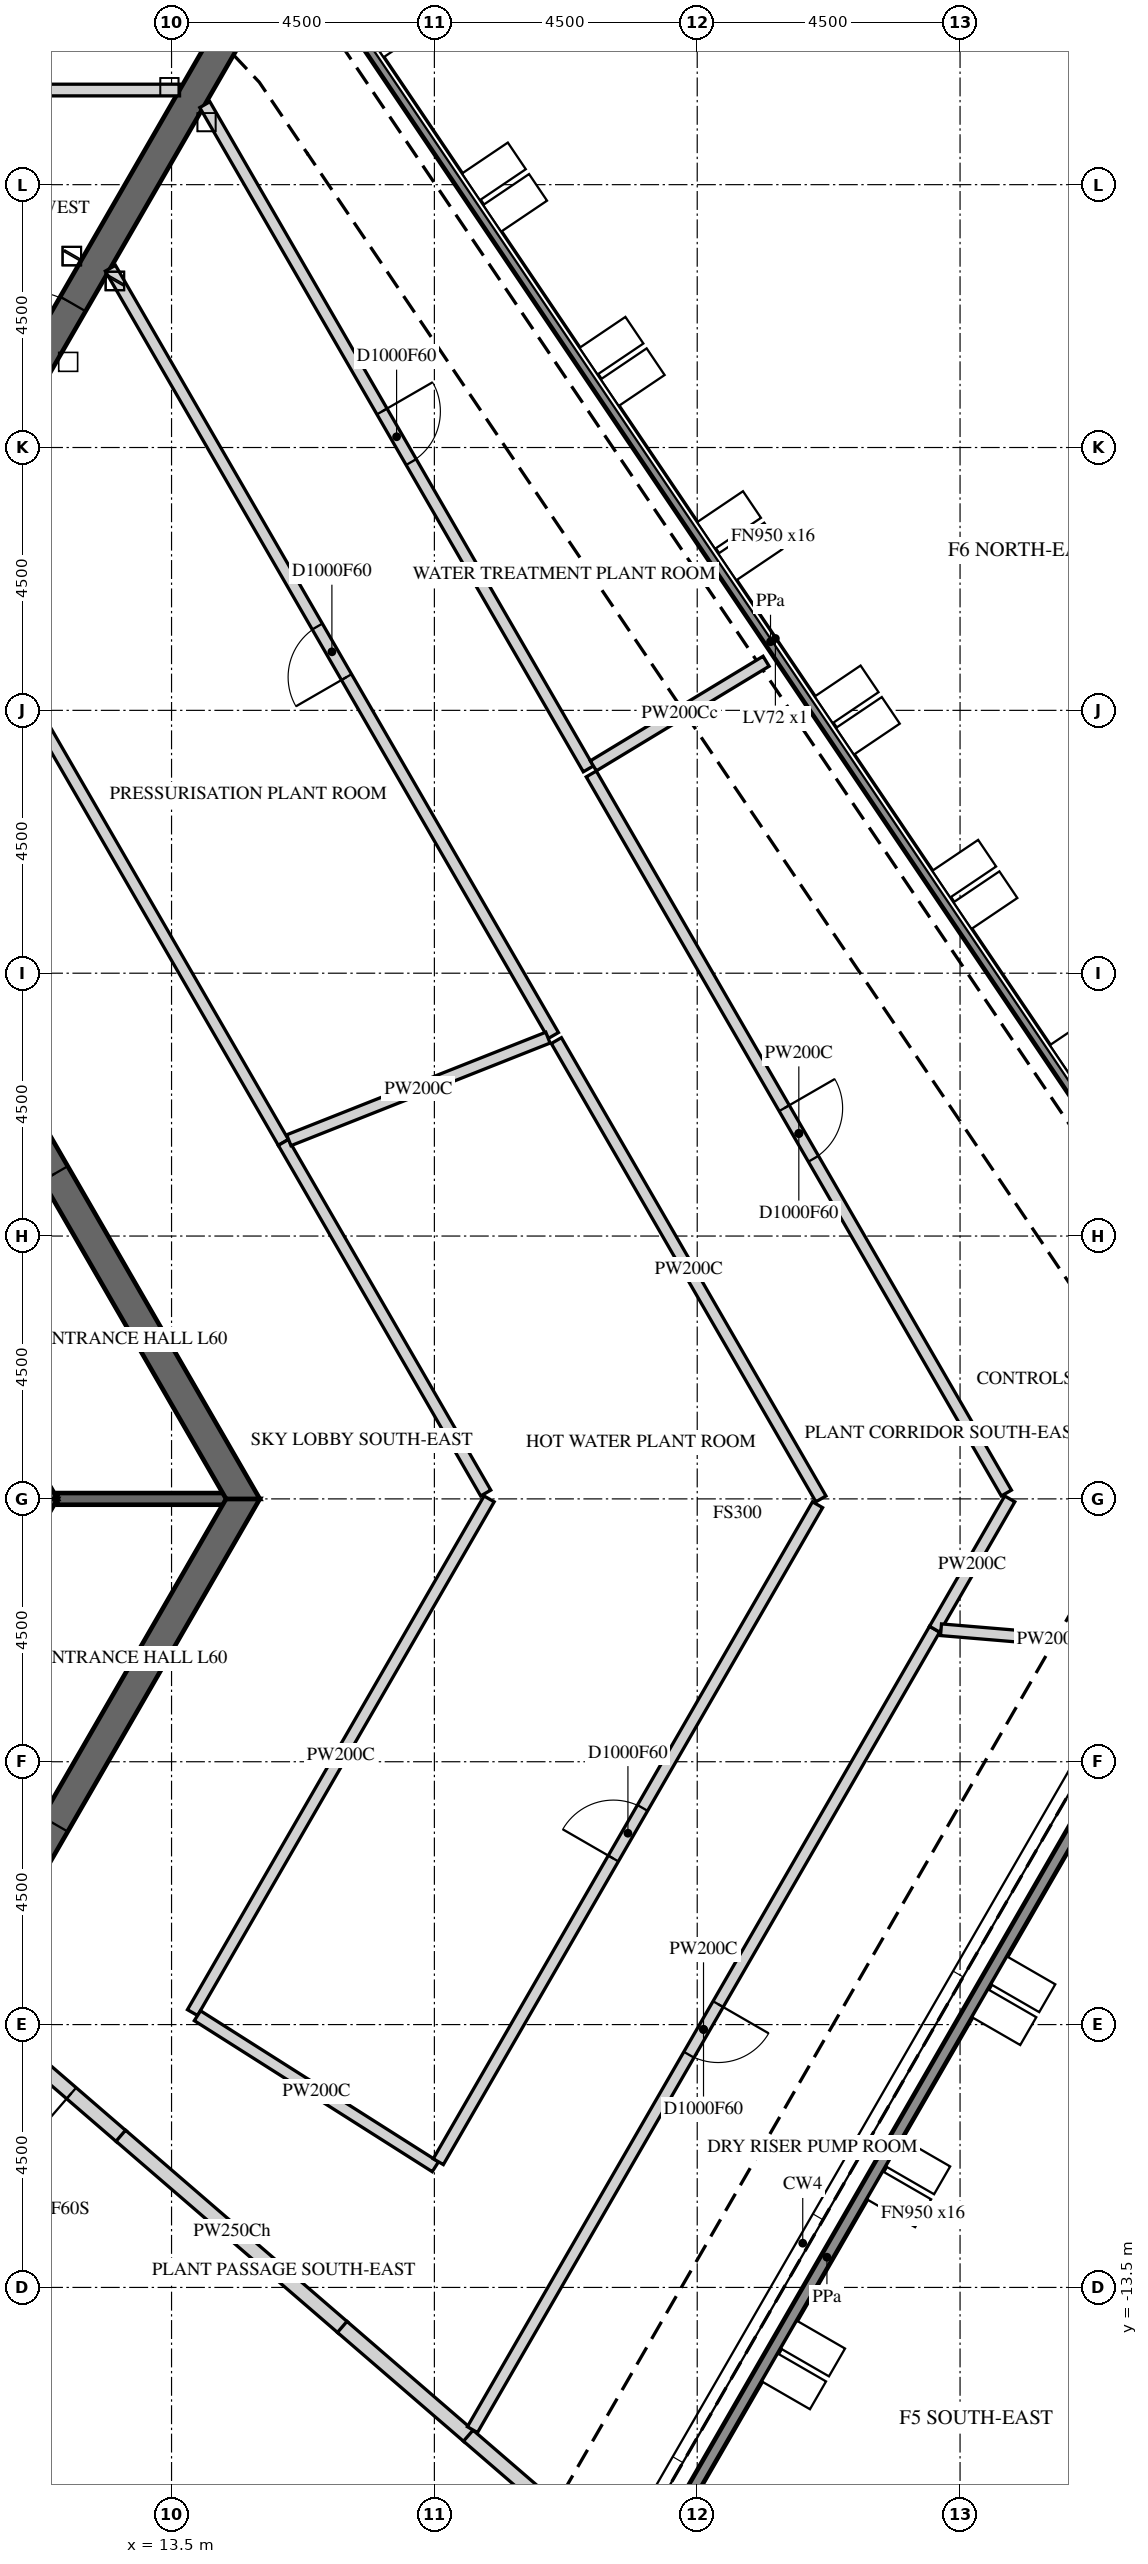
"""IFC4 building model, lengths in metres.
Left out: names, types, materials, properties, quantities, classifications, styles, units other than length and angle.
Written with IfcOpenShell. Run it as: python <this file> out.ifc"""

import sys

from ifc_helpers import new_model, si_unit, direction, frame, frame_2d, origin, place, context, subcontext, project, spatial, polyline, rectangle, outline, extrude, element, fill, save


model = new_model("IFC4")
c1 = context("Model", 3, precision=1e-05, world=origin(), true_north=direction((0.0, 1.0)))
c2 = subcontext(c1, "Body", "Model", "MODEL_VIEW")
j1 = project(units=[si_unit("LENGTHUNIT", "METRE"), si_unit("PLANEANGLEUNIT", "RADIAN")], contexts=[c1])
p1 = place(None, origin())
s1 = spatial("IfcSite", under=j1, at=p1, CompositionType="ELEMENT")
p2 = place(p1, origin())
s2 = spatial("IfcBuilding", under=s1, at=p2, CompositionType="ELEMENT")
p3 = place(p2, frame((0.0, 0.0, 250.2)))
s3 = spatial("IfcBuildingStorey", under=s2, at=p3, CompositionType="ELEMENT", Elevation=250.2)
p4 = place(p3, frame((15.999, 26.174, 5.7), z_axis=(0.0, 0.0, 1.0), x_axis=(0.559192735444, -0.82903768589, 0.0)))
e1 = element("IfcWall", 1, at=p4, inside=s3, PredefinedType="PARAPET", context=c2, shape_type="SweptSolid", body=[
    extrude(outline(polyline([(0.008, -0.1), (27.731, -0.1), (27.75, 0.1), (-0.008, 0.1), (0.008, -0.1)])), origin(), (0.0, 0.0, 1.0), 1.1),
])
p5 = place(p3, frame((31.656, -0.97, 5.7), z_axis=(0.0, 0.0, 1.0), x_axis=(-0.499997219864, -0.866027008891, 0.0)))
e2 = element("IfcWall", 2, at=p5, inside=s3, PredefinedType="PARAPET", context=c2, shape_type="SweptSolid", body=[
    extrude(outline(polyline([(0.009, -0.1), (27.732, -0.1), (27.749, 0.1), (-0.009, 0.1), (0.009, -0.1)])), origin(), (0.0, 0.0, 1.0), 1.1),
])
p6 = place(p3, frame((7.361, -12.75, -0.3), z_axis=(0.0, 0.0, 1.0), x_axis=(0.50000571537, 0.866022103989, 0.0)))
e3 = element("IfcWall", 3, at=p6, inside=s3, PredefinedType="SHEAR", context=c2, shape_type="SweptSolid", body=[
    extrude(outline(polyline([(-0.144, -0.25), (14.867, -0.25), (14.578, 0.25), (0.144, 0.25), (-0.144, -0.25)])), origin(), (0.0, 0.0, 1.0), 5.8),
])
p7 = place(p6, frame((6.49, 0.0, 0.3)))
e4 = element("IfcOpeningElement", 4, at=p7, cuts=e3, PredefinedType="OPENING", context=c2, shape_type="SweptSolid", body=[
    extrude(rectangle(XDim=1.8, YDim=2.4, at=frame_2d((0.9, 1.2))), frame((0.0, 0.26, 0.0), z_axis=(0.0, -1.0, 0.0), x_axis=(1.0, 0.0, 0.0)), (0.0, 0.0, 1.0), 0.52),
])
p8 = place(p3, frame((14.722, 0.0, -0.3), z_axis=(0.0, 0.0, 1.0), x_axis=(-0.50000571537, 0.866022103989, 0.0)))
e5 = element("IfcWall", 5, at=p8, inside=s3, PredefinedType="SHEAR", context=c2, shape_type="SweptSolid", body=[
    extrude(outline(polyline([(-0.144, -0.25), (14.867, -0.25), (14.578, 0.25), (0.144, 0.25), (-0.144, -0.25)])), origin(), (0.0, 0.0, 1.0), 5.8),
])
p9 = place(p8, frame((6.432, 0.0, 0.3)))
e6 = element("IfcOpeningElement", 6, at=p9, cuts=e5, PredefinedType="OPENING", context=c2, shape_type="SweptSolid", body=[
    extrude(rectangle(XDim=1.8, YDim=2.4, at=frame_2d((0.9, 1.2))), frame((0.0, 0.26, 0.0), z_axis=(0.0, -1.0, 0.0), x_axis=(1.0, 0.0, 0.0)), (0.0, 0.0, 1.0), 0.52),
])
p10 = place(p3, frame((7.506, 13.0, -0.3), z_axis=(0.0, 0.0, 1.0), x_axis=(0.499988271576, 0.866032175087, 0.0)))
e7 = element("IfcWall", 7, at=p10, inside=s3, PredefinedType="SHEAR", context=c2, shape_type="SweptSolid", body=[
    extrude(rectangle(XDim=15.424, YDim=0.5, at=frame_2d((7.712, 0.0))), origin(), (0.0, 0.0, 1.0), 5.8),
])
p11 = place(p10, frame((6.812, 0.0, 0.3)))
e8 = element("IfcOpeningElement", 8, at=p11, cuts=e7, PredefinedType="OPENING", context=c2, shape_type="SweptSolid", body=[
    extrude(rectangle(XDim=1.8, YDim=2.4, at=frame_2d((0.9, 1.2))), frame((0.0, 0.26, 0.0), z_axis=(0.0, -1.0, 0.0), x_axis=(1.0, 0.0, 0.0)), (0.0, 0.0, 1.0), 0.52),
])
p12 = place(p3, frame((7.506, -13.0, -0.3), z_axis=(0.0, 0.0, 1.0), x_axis=(0.499988271576, -0.866032175087, 0.0)))
e9 = element("IfcWall", 9, at=p12, inside=s3, PredefinedType="SHEAR", context=c2, shape_type="SweptSolid", body=[
    extrude(rectangle(XDim=15.424, YDim=0.5, at=frame_2d((7.712, 0.0))), origin(), (0.0, 0.0, 1.0), 5.8),
])
p13 = place(p12, frame((6.812, 0.0, 0.3)))
e10 = element("IfcOpeningElement", 10, at=p13, cuts=e9, PredefinedType="OPENING", context=c2, shape_type="SweptSolid", body=[
    extrude(rectangle(XDim=1.8, YDim=2.4, at=frame_2d((0.9, 1.2))), frame((0.0, 0.26, 0.0), z_axis=(0.0, -1.0, 0.0), x_axis=(1.0, 0.0, 0.0)), (0.0, 0.0, 1.0), 0.52),
])
p14 = place(p3, frame((5.673, -9.825, -0.3), z_axis=(0.0, 0.0, 1.0), x_axis=(0.499995046907, 0.866028263435, 0.0)))
e11 = element("IfcWall", 11, at=p14, inside=s3, PredefinedType="SHEAR", context=c2, shape_type="SweptSolid", body=[
    extrude(outline(polyline([(-0.101, -0.175), (11.446, -0.175), (11.244, 0.175), (0.101, 0.175), (-0.101, -0.175)])), origin(), (0.0, 0.0, 1.0), 5.8),
])
p15 = place(p14, frame((4.801, 0.0, 0.3)))
e12 = element("IfcOpeningElement", 12, at=p15, cuts=e11, PredefinedType="OPENING", context=c2, shape_type="SweptSolid", body=[
    extrude(rectangle(XDim=1.8, YDim=2.4, at=frame_2d((0.9, 1.2))), frame((0.0, 0.185, 0.0), z_axis=(0.0, -1.0, 0.0), x_axis=(1.0, 0.0, 0.0)), (0.0, 0.0, 1.0), 0.37),
])
p16 = place(p3, frame((11.345, 0.0, -0.3), z_axis=(0.0, 0.0, 1.0), x_axis=(-0.499995046907, 0.866028263435, 0.0)))
e13 = element("IfcWall", 13, at=p16, inside=s3, PredefinedType="SHEAR", context=c2, shape_type="SweptSolid", body=[
    extrude(outline(polyline([(-0.101, -0.175), (11.446, -0.175), (11.244, 0.175), (0.101, 0.175), (-0.101, -0.175)])), origin(), (0.0, 0.0, 1.0), 5.8),
])
p17 = place(p16, frame((4.744, 0.0, 0.3)))
e14 = element("IfcOpeningElement", 14, at=p17, cuts=e13, PredefinedType="OPENING", context=c2, shape_type="SweptSolid", body=[
    extrude(rectangle(XDim=1.8, YDim=2.4, at=frame_2d((0.9, 1.2))), frame((0.0, 0.185, 0.0), z_axis=(0.0, -1.0, 0.0), x_axis=(1.0, 0.0, 0.0)), (0.0, 0.0, 1.0), 0.37),
])
p18 = place(p3, frame((11.547, 0.0, -0.3), z_axis=(0.0, 0.0, 1.0), x_axis=(1.0, 0.0, 0.0)))
e15 = element("IfcWall", 15, at=p18, inside=s3, PredefinedType="SHEAR", context=c2, shape_type="SweptSolid", body=[
    extrude(rectangle(XDim=2.887, YDim=0.2, at=frame_2d((1.443, 0.0))), origin(), (0.0, 0.0, 1.0), 5.8),
])
p19 = place(p3, frame((12.645, -10.917, 0.0), z_axis=(0.0, 0.0, 1.0), x_axis=(-0.756778725629, 0.653671140892, 0.0)))
e16 = element("IfcWall", 16, at=p19, inside=s3, PredefinedType="PARTITIONING", context=c2, shape_type="SweptSolid", body=[
    extrude(rectangle(XDim=3.471, YDim=0.25, at=frame_2d((1.736, 0.0))), origin(), (0.0, 0.0, 1.0), 4.573),
])
p20 = place(p19, frame((1.135, 0.0, 0.0)))
e17 = element("IfcOpeningElement", 17, at=p20, cuts=e16, PredefinedType="OPENING", context=c2, shape_type="SweptSolid", body=[
    extrude(rectangle(XDim=1.2, YDim=2.1, at=frame_2d((0.6, 1.05))), frame((0.0, 0.135, 0.0), z_axis=(0.0, -1.0, 0.0), x_axis=(1.0, 0.0, 0.0)), (0.0, 0.0, 1.0), 0.27),
])
p21 = place(p3, frame((20.038, 7.934, 0.0), z_axis=(0.0, 0.0, 1.0), x_axis=(-0.500056356876, 0.865992863682, 0.0)))
e18 = element("IfcWall", 18, at=p21, inside=s3, PredefinedType="PARTITIONING", context=c2, shape_type="SweptSolid", body=[
    extrude(rectangle(XDim=15.169, YDim=0.2, at=frame_2d((7.584, 0.0))), origin(), (0.0, 0.0, 1.0), 5.5),
])
p22 = place(p21, frame((7.084, 0.0, 0.0)))
e19 = element("IfcOpeningElement", 19, at=p22, cuts=e18, PredefinedType="OPENING", context=c2, shape_type="SweptSolid", body=[
    extrude(rectangle(XDim=1.0, YDim=2.1, at=frame_2d((0.5, 1.05))), frame((0.0, 0.11, 0.0), z_axis=(0.0, -1.0, 0.0), x_axis=(1.0, 0.0, 0.0)), (0.0, 0.0, 1.0), 0.22),
])
p23 = place(p3, frame((12.631, -10.903, 0.0), z_axis=(0.0, 0.0, 1.0), x_axis=(0.756924533262, -0.653502296053, 0.0)))
e20 = element("IfcWall", 20, at=p23, inside=s3, PredefinedType="PARTITIONING", context=c2, shape_type="SweptSolid", body=[
    extrude(rectangle(XDim=5.028, YDim=0.25, at=frame_2d((2.514, 0.0))), origin(), (0.0, 0.0, 1.0), 4.573),
])
p24 = place(p3, frame((7.916, 24.12, 0.0), z_axis=(0.0, 0.0, 1.0), x_axis=(1.0, 0.0, 0.0)))
e21 = element("IfcWall", 21, at=p24, inside=s3, PredefinedType="PARTITIONING", context=c2, shape_type="SweptSolid", body=[
    extrude(rectangle(XDim=5.721, YDim=0.2, at=frame_2d((2.861, 0.0))), origin(), (0.0, 0.0, 1.0), 5.5),
])
p25 = place(p24, frame((2.361, 0.0, 0.0)))
e22 = element("IfcOpeningElement", 22, at=p25, cuts=e21, PredefinedType="OPENING", context=c2, shape_type="SweptSolid", body=[
    extrude(rectangle(XDim=1.0, YDim=2.1, at=frame_2d((0.5, 1.05))), frame((0.0, 0.11, 0.0), z_axis=(0.0, -1.0, 0.0), x_axis=(1.0, 0.0, 0.0)), (0.0, 0.0, 1.0), 0.22),
])
p26 = place(p3, frame((13.859, -8.795, 0.0), z_axis=(0.0, 0.0, 1.0), x_axis=(0.500027655771, 0.866009436129, 0.0)))
e23 = element("IfcWall", 23, at=p26, inside=s3, PredefinedType="PARTITIONING", context=c2, shape_type="SweptSolid", body=[
    extrude(rectangle(XDim=10.156, YDim=0.2, at=frame_2d((5.078, 0.0))), origin(), (0.0, 0.0, 1.0), 5.5),
])
p27 = place(p3, frame((15.414, 6.103, 0.0), z_axis=(0.0, 0.0, 1.0), x_axis=(-0.50002969912, 0.86600825631, 0.0)))
e24 = element("IfcWall", 24, at=p27, inside=s3, PredefinedType="PARTITIONING", context=c2, shape_type="SweptSolid", body=[
    extrude(rectangle(XDim=11.601, YDim=0.2, at=frame_2d((5.801, 0.0))), origin(), (0.0, 0.0, 1.0), 5.5),
])
p28 = place(p3, frame((16.422, -14.176, 0.0), z_axis=(0.0, 0.0, 1.0), x_axis=(0.756922439124, -0.653504721598, 0.0)))
e25 = element("IfcWall", 25, at=p28, inside=s3, PredefinedType="PARTITIONING", context=c2, shape_type="SweptSolid", body=[
    extrude(rectangle(XDim=2.871, YDim=0.25, at=frame_2d((1.435, 0.0))), origin(), (0.0, 0.0, 1.0), 5.5),
])
p29 = place(p3, frame((18.017, -11.434, 0.0), z_axis=(0.0, 0.0, 1.0), x_axis=(-0.844296399795, 0.535876468315, 0.0)))
e26 = element("IfcWall", 26, at=p29, inside=s3, PredefinedType="PARTITIONING", context=c2, shape_type="SweptSolid", body=[
    extrude(rectangle(XDim=4.825, YDim=0.2, at=frame_2d((2.412, 0.0))), origin(), (0.0, 0.0, 1.0), 5.5),
])
p30 = place(p3, frame((18.58, -16.038, 0.0), z_axis=(0.0, 0.0, 1.0), x_axis=(0.756983085106, -0.653434471744, 0.0)))
e27 = element("IfcWall", 27, at=p30, inside=s3, PredefinedType="PARTITIONING", context=c2, shape_type="SweptSolid", body=[
    extrude(rectangle(XDim=3.6, YDim=0.25, at=frame_2d((1.8, 0.0))), origin(), (0.0, 0.0, 1.0), 5.5),
])
p31 = place(p3, frame((26.564, -2.231, 0.0), z_axis=(0.0, 0.0, 1.0), x_axis=(-0.500020273296, -0.866013698675, 0.0)))
e28 = element("IfcWall", 28, at=p31, inside=s3, PredefinedType="PARTITIONING", context=c2, shape_type="SweptSolid", body=[
    extrude(rectangle(XDim=15.824, YDim=0.2, at=frame_2d((7.912, 0.0))), origin(), (0.0, 0.0, 1.0), 5.5),
])
p32 = place(p31, frame((7.412, 0.0, 0.0)))
e29 = element("IfcOpeningElement", 29, at=p32, cuts=e28, PredefinedType="OPENING", context=c2, shape_type="SweptSolid", body=[
    extrude(rectangle(XDim=1.0, YDim=2.1, at=frame_2d((0.5, 1.05))), frame((0.0, 0.11, 0.0), z_axis=(0.0, -1.0, 0.0), x_axis=(1.0, 0.0, 0.0)), (0.0, 0.0, 1.0), 0.22),
])
p33 = place(p3, frame((18.879, 0.1, 0.0), z_axis=(0.0, 0.0, 1.0), x_axis=(-0.499923693419, 0.866069454927, 0.0)))
e30 = element("IfcWall", 30, at=p33, inside=s3, PredefinedType="PARTITIONING", context=c2, shape_type="SweptSolid", body=[
    extrude(rectangle(XDim=6.931, YDim=0.2, at=frame_2d((3.466, 0.0))), origin(), (0.0, 0.0, 1.0), 5.5),
])
p34 = place(p3, frame((19.944, 7.897, 0.0), z_axis=(0.0, 0.0, 1.0), x_axis=(-0.929759179484, -0.368168260671, 0.0)))
e31 = element("IfcWall", 31, at=p34, inside=s3, PredefinedType="PARTITIONING", context=c2, shape_type="SweptSolid", body=[
    extrude(rectangle(XDim=4.771, YDim=0.2, at=frame_2d((2.386, 0.0))), origin(), (0.0, 0.0, 1.0), 5.5),
])
p35 = place(p3, frame((20.089, 7.846, 0.0), z_axis=(0.0, 0.0, 1.0), x_axis=(0.499930063508, -0.866065777872, 0.0)))
e32 = element("IfcWall", 32, at=p35, inside=s3, PredefinedType="PARTITIONING", context=c2, shape_type="SweptSolid", body=[
    extrude(rectangle(XDim=9.06, YDim=0.2, at=frame_2d((4.53, 0.0))), origin(), (0.0, 0.0, 1.0), 5.5),
])
p36 = place(p3, frame((14.07, 23.87, 0.0), z_axis=(0.0, 0.0, 1.0), x_axis=(0.500014285048, -0.866017156151, 0.0)))
e33 = element("IfcWall", 33, at=p36, inside=s3, PredefinedType="PARTITIONING", context=c2, shape_type="SweptSolid", body=[
    extrude(rectangle(XDim=13.131, YDim=0.2, at=frame_2d((6.566, 0.0))), origin(), (0.0, 0.0, 1.0), 5.5),
])
p37 = place(p36, frame((6.066, 0.0, 0.0)))
e34 = element("IfcOpeningElement", 34, at=p37, cuts=e33, PredefinedType="OPENING", context=c2, shape_type="SweptSolid", body=[
    extrude(rectangle(XDim=1.0, YDim=2.1, at=frame_2d((0.5, 1.05))), frame((0.0, 0.11, 0.0), z_axis=(0.0, -1.0, 0.0), x_axis=(1.0, 0.0, 0.0)), (0.0, 0.0, 1.0), 0.22),
])
p38 = place(p3, frame((23.679, 14.341, 0.0), z_axis=(0.0, 0.0, 1.0), x_axis=(-0.855411164344, -0.517949553447, 0.0)))
e35 = element("IfcWall", 35, at=p38, inside=s3, PredefinedType="PARTITIONING", context=c2, shape_type="SweptSolid", body=[
    extrude(rectangle(XDim=3.458, YDim=0.2, at=frame_2d((1.729, 0.0))), origin(), (0.0, 0.0, 1.0), 4.573),
])
p39 = place(p3, frame((18.067, -11.347, 0.0), z_axis=(0.0, 0.0, 1.0), x_axis=(0.49997251285, 0.866041272916, 0.0)))
e36 = element("IfcWall", 36, at=p39, inside=s3, PredefinedType="PARTITIONING", context=c2, shape_type="SweptSolid", body=[
    extrude(rectangle(XDim=12.987, YDim=0.2, at=frame_2d((6.494, 0.0))), origin(), (0.0, 0.0, 1.0), 5.5),
])
p40 = place(p39, frame((5.994, 0.0, 0.0)))
e37 = element("IfcOpeningElement", 37, at=p40, cuts=e36, PredefinedType="OPENING", context=c2, shape_type="SweptSolid", body=[
    extrude(rectangle(XDim=1.0, YDim=2.1, at=frame_2d((0.5, 1.05))), frame((0.0, 0.11, 0.0), z_axis=(0.0, -1.0, 0.0), x_axis=(1.0, 0.0, 0.0)), (0.0, 0.0, 1.0), 0.22),
])
p41 = place(p3, frame((26.564, -2.231, 0.0), z_axis=(0.0, 0.0, 1.0), x_axis=(0.499727924102, 0.866182429903, 0.0)))
e38 = element("IfcWall", 38, at=p41, inside=s3, PredefinedType="PARTITIONING", context=c2, shape_type="SweptSolid", body=[
    extrude(rectangle(XDim=2.576, YDim=0.2, at=frame_2d((1.288, 0.0))), origin(), (0.0, 0.0, 1.0), 5.5),
])
p42 = place(p3, frame((20.686, 12.411, 0.0), z_axis=(0.0, 0.0, 1.0), x_axis=(0.499960816026, -0.86604802548, 0.0)))
e39 = element("IfcWall", 39, at=p42, inside=s3, PredefinedType="PARTITIONING", context=c2, shape_type="SweptSolid", body=[
    extrude(rectangle(XDim=14.216, YDim=0.2, at=frame_2d((7.108, 0.0))), origin(), (0.0, 0.0, 1.0), 5.5),
])
p43 = place(p42, frame((6.608, 0.0, 0.0)))
e40 = element("IfcOpeningElement", 40, at=p43, cuts=e39, PredefinedType="OPENING", context=c2, shape_type="SweptSolid", body=[
    extrude(rectangle(XDim=1.0, YDim=2.1, at=frame_2d((0.5, 1.05))), frame((0.0, 0.11, 0.0), z_axis=(0.0, -1.0, 0.0), x_axis=(1.0, 0.0, 0.0)), (0.0, 0.0, 1.0), 0.22),
])
p44 = place(p3, frame((30.43, -2.556, 0.0), z_axis=(0.0, 0.0, 1.0), x_axis=(-0.996492851247, 0.083677938633, 0.0)))
e41 = element("IfcWall", 41, at=p44, inside=s3, PredefinedType="PARTITIONING", context=c2, shape_type="SweptSolid", body=[
    extrude(rectangle(XDim=3.77, YDim=0.2, at=frame_2d((1.885, 0.0))), origin(), (0.0, 0.0, 1.0), 5.5),
])
p45 = place(p9, origin())
e42 = element("IfcDoor", 42, at=p45, inside=s3, OperationType="DOUBLE_DOOR_SINGLE_SWING", PredefinedType="DOOR", context=c2, shape_type="SweptSolid", body=[
    extrude(rectangle(XDim=1.8, YDim=2.4, at=frame_2d((0.9, 1.2))), frame((0.0, 0.025, 0.0), z_axis=(0.0, -1.0, 0.0), x_axis=(1.0, 0.0, 0.0)), (0.0, 0.0, 1.0), 0.05),
])
fill(e6, e42)
p46 = place(p7, origin())
e43 = element("IfcDoor", 43, at=p46, inside=s3, OperationType="DOUBLE_DOOR_SINGLE_SWING", PredefinedType="DOOR", context=c2, shape_type="SweptSolid", body=[
    extrude(rectangle(XDim=1.8, YDim=2.4, at=frame_2d((0.9, 1.2))), frame((0.0, 0.025, 0.0), z_axis=(0.0, -1.0, 0.0), x_axis=(1.0, 0.0, 0.0)), (0.0, 0.0, 1.0), 0.05),
])
fill(e4, e43)
p47 = place(p11, origin())
e44 = element("IfcDoor", 44, at=p47, inside=s3, OperationType="DOUBLE_DOOR_SINGLE_SWING", PredefinedType="DOOR", context=c2, shape_type="SweptSolid", body=[
    extrude(rectangle(XDim=1.8, YDim=2.4, at=frame_2d((0.9, 1.2))), frame((0.0, 0.025, 0.0), z_axis=(0.0, -1.0, 0.0), x_axis=(1.0, 0.0, 0.0)), (0.0, 0.0, 1.0), 0.05),
])
fill(e8, e44)
p48 = place(p20, origin())
e45 = element("IfcDoor", 45, at=p48, inside=s3, OperationType="SINGLE_SWING_LEFT", PredefinedType="DOOR", context=c2, shape_type="SweptSolid", body=[
    extrude(rectangle(XDim=1.2, YDim=2.1, at=frame_2d((0.6, 1.05))), frame((0.0, 0.025, 0.0), z_axis=(0.0, -1.0, 0.0), x_axis=(1.0, 0.0, 0.0)), (0.0, 0.0, 1.0), 0.05),
])
fill(e17, e45)
p49 = place(p22, origin())
e46 = element("IfcDoor", 46, at=p49, inside=s3, OperationType="SINGLE_SWING_LEFT", PredefinedType="DOOR", context=c2, shape_type="SweptSolid", body=[
    extrude(rectangle(XDim=1.0, YDim=2.1, at=frame_2d((0.5, 1.05))), frame((0.0, 0.025, 0.0), z_axis=(0.0, -1.0, 0.0), x_axis=(1.0, 0.0, 0.0)), (0.0, 0.0, 1.0), 0.05),
])
fill(e19, e46)
p50 = place(p32, origin())
e47 = element("IfcDoor", 47, at=p50, inside=s3, OperationType="SINGLE_SWING_LEFT", PredefinedType="DOOR", context=c2, shape_type="SweptSolid", body=[
    extrude(rectangle(XDim=1.0, YDim=2.1, at=frame_2d((0.5, 1.05))), frame((0.0, 0.025, 0.0), z_axis=(0.0, -1.0, 0.0), x_axis=(1.0, 0.0, 0.0)), (0.0, 0.0, 1.0), 0.05),
])
fill(e29, e47)
p51 = place(p37, origin())
e48 = element("IfcDoor", 48, at=p51, inside=s3, OperationType="SINGLE_SWING_RIGHT", PredefinedType="DOOR", context=c2, shape_type="SweptSolid", body=[
    extrude(rectangle(XDim=1.0, YDim=2.1, at=frame_2d((0.5, 1.05))), frame((0.0, 0.025, 0.0), z_axis=(0.0, -1.0, 0.0), x_axis=(1.0, 0.0, 0.0)), (0.0, 0.0, 1.0), 0.05),
])
fill(e34, e48)
p52 = place(p40, origin())
e49 = element("IfcDoor", 49, at=p52, inside=s3, OperationType="SINGLE_SWING_LEFT", PredefinedType="DOOR", context=c2, shape_type="SweptSolid", body=[
    extrude(rectangle(XDim=1.0, YDim=2.1, at=frame_2d((0.5, 1.05))), frame((0.0, 0.025, 0.0), z_axis=(0.0, -1.0, 0.0), x_axis=(1.0, 0.0, 0.0)), (0.0, 0.0, 1.0), 0.05),
])
fill(e37, e49)
p53 = place(p43, origin())
e50 = element("IfcDoor", 50, at=p53, inside=s3, OperationType="SINGLE_SWING_RIGHT", PredefinedType="DOOR", context=c2, shape_type="SweptSolid", body=[
    extrude(rectangle(XDim=1.0, YDim=2.1, at=frame_2d((0.5, 1.05))), frame((0.0, 0.025, 0.0), z_axis=(0.0, -1.0, 0.0), x_axis=(1.0, 0.0, 0.0)), (0.0, 0.0, 1.0), 0.05),
])
fill(e40, e50)
save(model, sys.argv[1])
